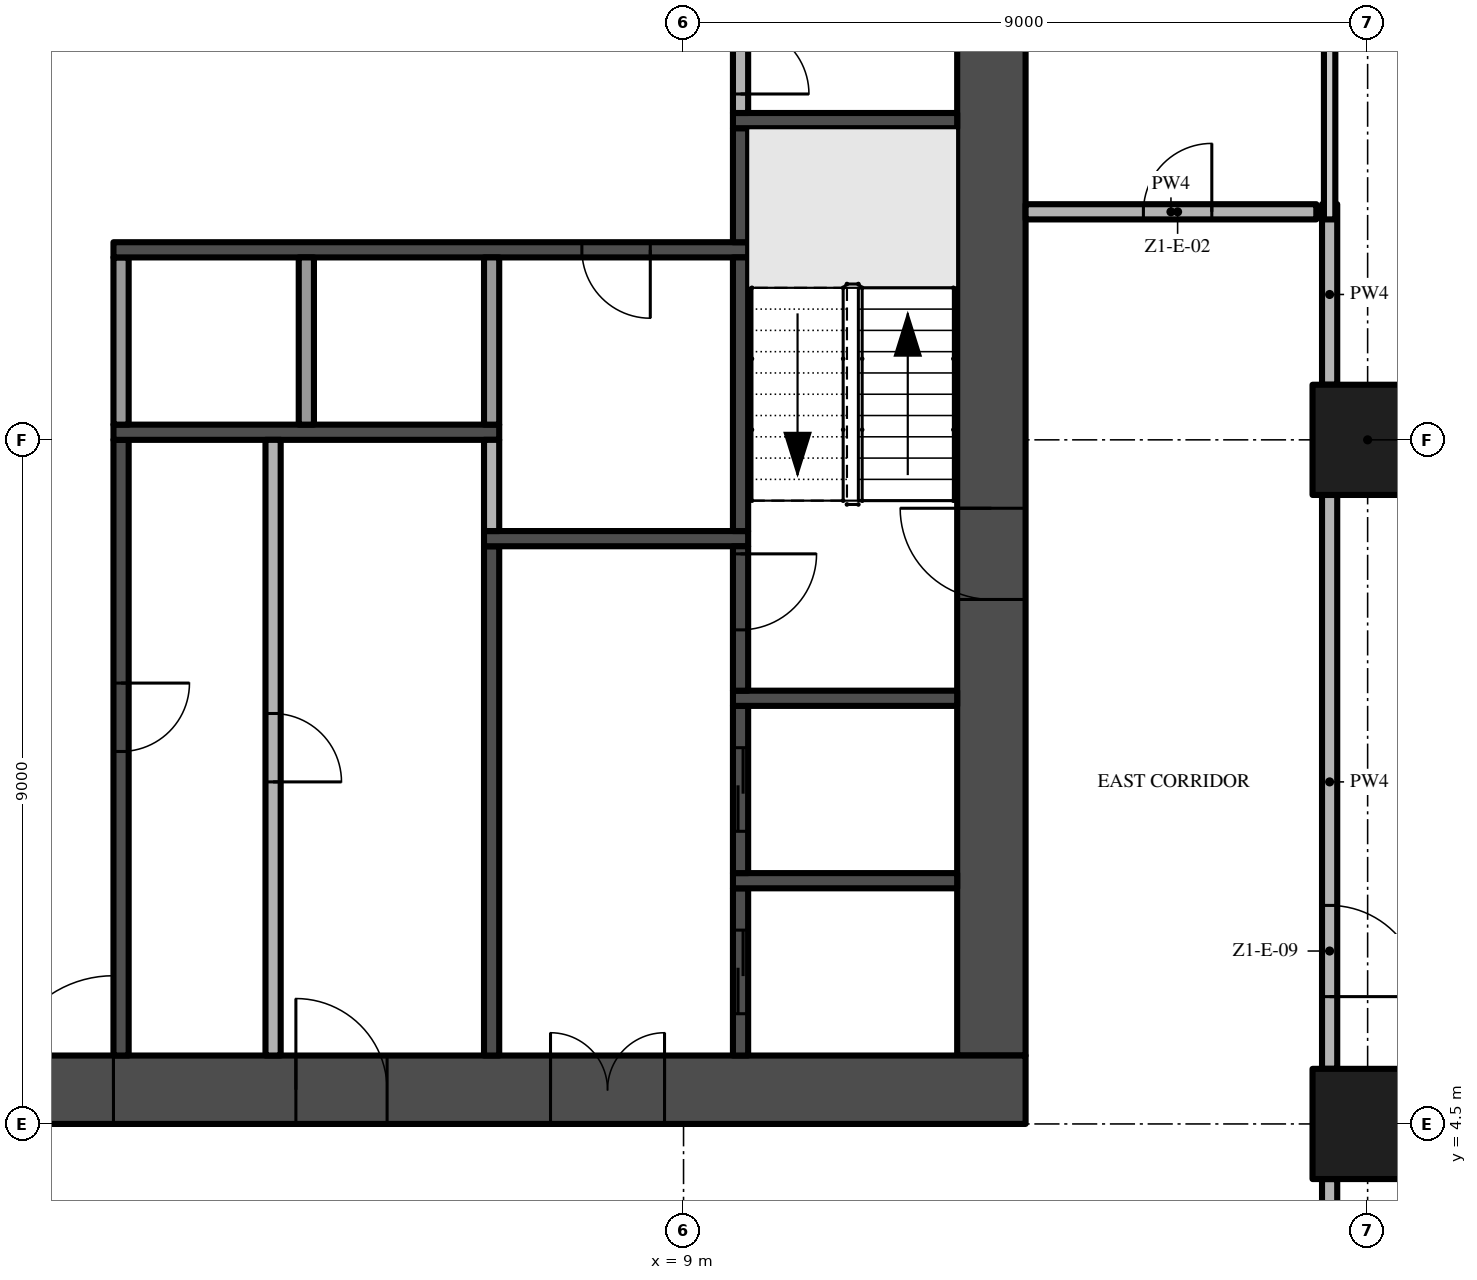
"""IFC4 building model, lengths in metres.
Left out: names, types, materials, properties, quantities, classifications, styles, units other than length and angle.
Written with IfcOpenShell. Run it as: python <this file> out.ifc"""

import sys

from ifc_helpers import new_model, si_unit, direction, frame, frame_2d, origin, origin_2d, place, context, subcontext, project, spatial, rectangle, extrude, element, fill, save


model = new_model("IFC4")
c1 = context("Model", 3, precision=1e-05, world=origin(), true_north=direction((0.0, 1.0)))
c2 = subcontext(c1, "Body", "Model", "MODEL_VIEW")
j1 = project(units=[si_unit("LENGTHUNIT", "METRE"), si_unit("PLANEANGLEUNIT", "RADIAN")], contexts=[c1])
p1 = place(None, origin())
s1 = spatial("IfcSite", under=j1, at=p1, CompositionType="ELEMENT")
p2 = place(p1, origin())
s2 = spatial("IfcBuilding", under=s1, at=p2, CompositionType="ELEMENT")
p3 = place(p2, frame((0.0, 0.0, 60.6)))
s3 = spatial("IfcBuildingStorey", under=s2, at=p3, CompositionType="ELEMENT", Elevation=60.6)
p4 = place(p3, frame((-13.5, 4.95, -0.3), z_axis=(0.0, 0.0, 1.0), x_axis=(1.0, 0.0, 0.0)))
e1 = element("IfcWall", 1, at=p4, inside=s3, PredefinedType="SHEAR", context=c2, shape_type="SweptSolid", body=[
    extrude(rectangle(XDim=27.0, YDim=0.9, at=frame_2d((13.5, 0.0))), origin(), (0.0, 0.0, 1.0), 3.8),
])
p5 = place(p4, frame((12.0, 0.0, 0.3)))
e2 = element("IfcOpeningElement", 2, at=p5, cuts=e1, PredefinedType="OPENING", context=c2, shape_type="SweptSolid", body=[
    extrude(rectangle(XDim=3.0, YDim=2.4, at=frame_2d((1.5, 1.2))), frame((0.0, 0.46, 0.0), z_axis=(0.0, -1.0, 0.0), x_axis=(1.0, 0.0, 0.0)), (0.0, 0.0, 1.0), 0.92),
])
p6 = place(p4, frame((4.9, 0.0, 0.3)))
e3 = element("IfcOpeningElement", 3, at=p6, cuts=e1, PredefinedType="OPENING", context=c2, shape_type="SweptSolid", body=[
    extrude(rectangle(XDim=1.2, YDim=2.2, at=frame_2d((0.6, 1.1))), frame((0.0, 0.46, 0.0), z_axis=(0.0, -1.0, 0.0), x_axis=(1.0, 0.0, 0.0)), (0.0, 0.0, 1.0), 0.92),
])
p7 = place(p4, frame((20.75, 0.0, 0.3)))
e4 = element("IfcOpeningElement", 4, at=p7, cuts=e1, PredefinedType="OPENING", context=c2, shape_type="SweptSolid", body=[
    extrude(rectangle(XDim=1.5, YDim=2.2, at=frame_2d((0.75, 1.1))), frame((0.0, 0.46, 0.0), z_axis=(0.0, -1.0, 0.0), x_axis=(1.0, 0.0, 0.0)), (0.0, 0.0, 1.0), 0.92),
])
p8 = place(p4, frame((17.4, 0.0, 0.3)))
e5 = element("IfcOpeningElement", 5, at=p8, cuts=e1, PredefinedType="OPENING", context=c2, shape_type="SweptSolid", body=[
    extrude(rectangle(XDim=1.2, YDim=2.2, at=frame_2d((0.6, 1.1))), frame((0.0, 0.46, 0.0), z_axis=(0.0, -1.0, 0.0), x_axis=(1.0, 0.0, 0.0)), (0.0, 0.0, 1.0), 0.92),
])
p9 = place(p3, frame((13.05, 5.4, -0.3), z_axis=(0.0, 0.0, 1.0), x_axis=(0.0, 1.0, 0.0)))
e6 = element("IfcWall", 6, at=p9, inside=s3, PredefinedType="SHEAR", context=c2, shape_type="SweptSolid", body=[
    extrude(rectangle(XDim=16.2, YDim=0.9, at=frame_2d((8.1, 0.0))), origin(), (0.0, 0.0, 1.0), 3.8),
])
p10 = place(p9, frame((6.0, 0.0, 0.3)))
e7 = element("IfcOpeningElement", 7, at=p10, cuts=e6, PredefinedType="OPENING", context=c2, shape_type="SweptSolid", body=[
    extrude(rectangle(XDim=1.2, YDim=2.2, at=frame_2d((0.6, 1.1))), frame((0.0, 0.46, 0.0), z_axis=(0.0, -1.0, 0.0), x_axis=(1.0, 0.0, 0.0)), (0.0, 0.0, 1.0), 0.92),
])
for number, where, z_axis, x_axis in (
    (8, (18.0, 13.5, 0.0), (0.0, 0.0, 1.0), (1.0, 0.0, 0.0)),
    (9, (18.0, 4.5, 0.0), (0.0, 0.0, 1.0), (1.0, 0.0, 0.0)),
):
    element("IfcColumn", number, at=place(p3, frame(where, z_axis=z_axis, x_axis=x_axis)), inside=s3, PredefinedType="COLUMN", context=c2, shape_type="SweptSolid", body=[
        extrude(rectangle(XDim=1.45, YDim=1.45, at=origin_2d()), origin(), (0.0, 0.0, 1.0), 3.5),
    ])
p11 = place(p3, frame((1.6, 13.5, 0.0), z_axis=(0.0, 0.0, 1.0), x_axis=(0.0, -1.0, 0.0)))
e10 = element("IfcWall", 10, at=p11, inside=s3, PredefinedType="SHEAR", context=c2, shape_type="SweptSolid", body=[
    extrude(rectangle(XDim=8.1, YDim=0.2, at=frame_2d((4.05, 0.0))), origin(), (0.0, 0.0, 1.0), 3.5),
])
p12 = place(p11, frame((3.2, 0.0, 0.0)))
e11 = element("IfcOpeningElement", 11, at=p12, cuts=e10, PredefinedType="OPENING", context=c2, shape_type="SweptSolid", body=[
    extrude(rectangle(XDim=0.9, YDim=2.1, at=frame_2d((0.45, 1.05))), frame((0.0, 0.11, 0.0), z_axis=(0.0, -1.0, 0.0), x_axis=(1.0, 0.0, 0.0)), (0.0, 0.0, 1.0), 0.22),
])
p13 = place(p3, frame((1.5, 13.6, 0.0), z_axis=(0.0, 0.0, 1.0), x_axis=(1.0, 0.0, 0.0)))
e12 = element("IfcWall", 12, at=p13, inside=s3, PredefinedType="SHEAR", context=c2, shape_type="SweptSolid", body=[
    extrude(rectangle(XDim=5.075, YDim=0.2, at=frame_2d((2.538, 0.0))), origin(), (0.0, 0.0, 1.0), 3.5),
])
p14 = place(p3, frame((1.6, 13.7, 0.0), z_axis=(0.0, 0.0, 1.0), x_axis=(0.0, 1.0, 0.0)))
e13 = element("IfcWall", 13, at=p14, inside=s3, PredefinedType="PARTITIONING", context=c2, shape_type="SweptSolid", body=[
    extrude(rectangle(XDim=2.2, YDim=0.2, at=frame_2d((1.1, 0.0))), origin(), (0.0, 0.0, 1.0), 3.5),
])
p15 = place(p3, frame((9.85, 16.0, 0.0), z_axis=(0.0, 0.0, 1.0), x_axis=(-1.0, 0.0, 0.0)))
e14 = element("IfcWall", 14, at=p15, inside=s3, PredefinedType="SHEAR", context=c2, shape_type="SweptSolid", body=[
    extrude(rectangle(XDim=8.35, YDim=0.2, at=frame_2d((4.175, 0.0))), origin(), (0.0, 0.0, 1.0), 3.5),
])
p16 = place(p15, frame((1.288, 0.0, 0.0)))
e15 = element("IfcOpeningElement", 15, at=p16, cuts=e14, PredefinedType="OPENING", context=c2, shape_type="SweptSolid", body=[
    extrude(rectangle(XDim=0.9, YDim=2.1, at=frame_2d((0.45, 1.05))), frame((0.0, 0.11, 0.0), z_axis=(0.0, -1.0, 0.0), x_axis=(1.0, 0.0, 0.0)), (0.0, 0.0, 1.0), 0.22),
])
p17 = place(p3, frame((3.6, 13.5, 0.0), z_axis=(0.0, 0.0, 1.0), x_axis=(0.0, -1.0, 0.0)))
e16 = element("IfcWall", 16, at=p17, inside=s3, PredefinedType="PARTITIONING", context=c2, shape_type="SweptSolid", body=[
    extrude(rectangle(XDim=8.1, YDim=0.2, at=frame_2d((4.05, 0.0))), origin(), (0.0, 0.0, 1.0), 3.5),
])
p18 = place(p17, frame((3.6, 0.0, 0.0)))
e17 = element("IfcOpeningElement", 17, at=p18, cuts=e16, PredefinedType="OPENING", context=c2, shape_type="SweptSolid", body=[
    extrude(rectangle(XDim=0.9, YDim=2.1, at=frame_2d((0.45, 1.05))), frame((0.0, 0.11, 0.0), z_axis=(0.0, -1.0, 0.0), x_axis=(1.0, 0.0, 0.0)), (0.0, 0.0, 1.0), 0.22),
])
p19 = place(p3, frame((4.037, 13.7, 0.0), z_axis=(0.0, 0.0, 1.0), x_axis=(0.0, 1.0, 0.0)))
e18 = element("IfcWall", 18, at=p19, inside=s3, PredefinedType="PARTITIONING", context=c2, shape_type="SweptSolid", body=[
    extrude(rectangle(XDim=2.2, YDim=0.2, at=frame_2d((1.1, 0.0))), origin(), (0.0, 0.0, 1.0), 3.5),
])
p20 = place(p3, frame((6.475, 5.4, 0.0), z_axis=(0.0, 0.0, 1.0), x_axis=(0.0, 1.0, 0.0)))
e19 = element("IfcWall", 19, at=p20, inside=s3, PredefinedType="SHEAR", context=c2, shape_type="SweptSolid", body=[
    extrude(rectangle(XDim=6.7, YDim=0.2, at=frame_2d((3.35, 0.0))), origin(), (0.0, 0.0, 1.0), 3.5),
])
p21 = place(p3, frame((6.375, 12.2, 0.0), z_axis=(0.0, 0.0, 1.0), x_axis=(1.0, 0.0, 0.0)))
e20 = element("IfcWall", 20, at=p21, inside=s3, PredefinedType="SHEAR", context=c2, shape_type="SweptSolid", body=[
    extrude(rectangle(XDim=3.475, YDim=0.2, at=frame_2d((1.738, 0.0))), origin(), (0.0, 0.0, 1.0), 3.5),
])
p22 = place(p3, frame((6.475, 12.3, 0.0), z_axis=(0.0, 0.0, 1.0), x_axis=(0.0, 1.0, 0.0)))
e21 = element("IfcWall", 21, at=p22, inside=s3, PredefinedType="PARTITIONING", context=c2, shape_type="SweptSolid", body=[
    extrude(rectangle(XDim=1.2, YDim=0.2, at=frame_2d((0.6, 0.0))), origin(), (0.0, 0.0, 1.0), 3.5),
])
p23 = place(p3, frame((6.475, 13.7, 0.0), z_axis=(0.0, 0.0, 1.0), x_axis=(0.0, 1.0, 0.0)))
e22 = element("IfcWall", 22, at=p23, inside=s3, PredefinedType="PARTITIONING", context=c2, shape_type="SweptSolid", body=[
    extrude(rectangle(XDim=2.2, YDim=0.2, at=frame_2d((1.1, 0.0))), origin(), (0.0, 0.0, 1.0), 3.5),
])
p24 = place(p3, frame((9.75, 5.4, 0.0), z_axis=(0.0, 0.0, 1.0), x_axis=(0.0, 1.0, 0.0)))
e23 = element("IfcWall", 23, at=p24, inside=s3, PredefinedType="SHEAR", context=c2, shape_type="SweptSolid", body=[
    extrude(rectangle(XDim=2.2, YDim=0.2, at=frame_2d((1.1, 0.0))), origin(), (0.0, 0.0, 1.0), 3.5),
])
p25 = place(p24, frame((0.55, 0.0, 0.0)))
e24 = element("IfcOpeningElement", 24, at=p25, cuts=e23, PredefinedType="OPENING", context=c2, shape_type="SweptSolid", body=[
    extrude(rectangle(XDim=1.1, YDim=2.1, at=frame_2d((0.55, 1.05))), frame((0.0, 0.11, 0.0), z_axis=(0.0, -1.0, 0.0), x_axis=(1.0, 0.0, 0.0)), (0.0, 0.0, 1.0), 0.22),
])
p26 = place(p3, frame((9.65, 7.7, 0.0), z_axis=(0.0, 0.0, 1.0), x_axis=(1.0, 0.0, 0.0)))
e25 = element("IfcWall", 25, at=p26, inside=s3, PredefinedType="SHEAR", context=c2, shape_type="SweptSolid", body=[
    extrude(rectangle(XDim=2.95, YDim=0.2, at=frame_2d((1.475, 0.0))), origin(), (0.0, 0.0, 1.0), 3.5),
])
p27 = place(p3, frame((9.75, 7.8, 0.0), z_axis=(0.0, 0.0, 1.0), x_axis=(0.0, 1.0, 0.0)))
e26 = element("IfcWall", 26, at=p27, inside=s3, PredefinedType="SHEAR", context=c2, shape_type="SweptSolid", body=[
    extrude(rectangle(XDim=2.2, YDim=0.2, at=frame_2d((1.1, 0.0))), origin(), (0.0, 0.0, 1.0), 3.5),
])
p28 = place(p27, frame((0.55, 0.0, 0.0)))
e27 = element("IfcOpeningElement", 27, at=p28, cuts=e26, PredefinedType="OPENING", context=c2, shape_type="SweptSolid", body=[
    extrude(rectangle(XDim=1.1, YDim=2.1, at=frame_2d((0.55, 1.05))), frame((0.0, 0.11, 0.0), z_axis=(0.0, -1.0, 0.0), x_axis=(1.0, 0.0, 0.0)), (0.0, 0.0, 1.0), 0.22),
])
p29 = place(p3, frame((9.65, 10.1, 0.0), z_axis=(0.0, 0.0, 1.0), x_axis=(1.0, 0.0, 0.0)))
e28 = element("IfcWall", 28, at=p29, inside=s3, PredefinedType="SHEAR", context=c2, shape_type="SweptSolid", body=[
    extrude(rectangle(XDim=2.95, YDim=0.2, at=frame_2d((1.475, 0.0))), origin(), (0.0, 0.0, 1.0), 3.5),
])
p30 = place(p3, frame((9.75, 12.1, 0.0), z_axis=(0.0, 0.0, 1.0), x_axis=(0.0, -1.0, 0.0)))
e29 = element("IfcWall", 29, at=p30, inside=s3, PredefinedType="SHEAR", context=c2, shape_type="SweptSolid", body=[
    extrude(rectangle(XDim=1.9, YDim=0.2, at=frame_2d((0.95, 0.0))), origin(), (0.0, 0.0, 1.0), 3.5),
])
p31 = place(p30, frame((0.1, 0.0, 0.0)))
e30 = element("IfcOpeningElement", 30, at=p31, cuts=e29, PredefinedType="OPENING", context=c2, shape_type="SweptSolid", body=[
    extrude(rectangle(XDim=1.0, YDim=2.2, at=frame_2d((0.5, 1.1))), frame((0.0, 0.11, 0.0), z_axis=(0.0, -1.0, 0.0), x_axis=(1.0, 0.0, 0.0)), (0.0, 0.0, 1.0), 0.22),
])
p32 = place(p3, frame((9.75, 12.3, 0.0), z_axis=(0.0, 0.0, 1.0), x_axis=(0.0, 1.0, 0.0)))
e31 = element("IfcWall", 31, at=p32, inside=s3, PredefinedType="SHEAR", context=c2, shape_type="SweptSolid", body=[
    extrude(rectangle(XDim=3.6, YDim=0.2, at=frame_2d((1.8, 0.0))), origin(), (0.0, 0.0, 1.0), 3.5),
])
p33 = place(p3, frame((9.75, 16.1, 0.0), z_axis=(0.0, 0.0, 1.0), x_axis=(0.0, 1.0, 0.0)))
e32 = element("IfcWall", 32, at=p33, inside=s3, PredefinedType="SHEAR", context=c2, shape_type="SweptSolid", body=[
    extrude(rectangle(XDim=1.5, YDim=0.2, at=frame_2d((0.75, 0.0))), origin(), (0.0, 0.0, 1.0), 3.5),
])
p34 = place(p3, frame((9.65, 17.7, 0.0), z_axis=(0.0, 0.0, 1.0), x_axis=(1.0, 0.0, 0.0)))
e33 = element("IfcWall", 33, at=p34, inside=s3, PredefinedType="SHEAR", context=c2, shape_type="SweptSolid", body=[
    extrude(rectangle(XDim=2.95, YDim=0.2, at=frame_2d((1.475, 0.0))), origin(), (0.0, 0.0, 1.0), 3.5),
])
p35 = place(p3, frame((9.75, 19.2, 0.0), z_axis=(0.0, 0.0, 1.0), x_axis=(0.0, -1.0, 0.0)))
e34 = element("IfcWall", 34, at=p35, inside=s3, PredefinedType="PARTITIONING", context=c2, shape_type="SweptSolid", body=[
    extrude(rectangle(XDim=1.4, YDim=0.2, at=frame_2d((0.7, 0.0))), origin(), (0.0, 0.0, 1.0), 3.5),
])
p36 = place(p35, frame((0.25, 0.0, 0.0)))
e35 = element("IfcOpeningElement", 35, at=p36, cuts=e34, PredefinedType="OPENING", context=c2, shape_type="SweptSolid", body=[
    extrude(rectangle(XDim=0.9, YDim=2.1, at=frame_2d((0.45, 1.05))), frame((0.0, 0.11, 0.0), z_axis=(0.0, -1.0, 0.0), x_axis=(1.0, 0.0, 0.0)), (0.0, 0.0, 1.0), 0.22),
])
p37 = place(p3, frame((13.5, 16.5, 0.0), z_axis=(0.0, 0.0, 1.0), x_axis=(1.0, 0.0, 0.0)))
e36 = element("IfcWall", 36, at=p37, inside=s3, PredefinedType="PARTITIONING", context=c2, shape_type="SweptSolid", body=[
    extrude(rectangle(XDim=3.825, YDim=0.2, at=frame_2d((1.913, 0.0))), origin(), (0.0, 0.0, 1.0), 3.5),
])
p38 = place(p37, frame((1.55, 0.0, 0.0)))
e37 = element("IfcOpeningElement", 37, at=p38, cuts=e36, PredefinedType="OPENING", context=c2, shape_type="SweptSolid", body=[
    extrude(rectangle(XDim=0.9, YDim=2.1, at=frame_2d((0.45, 1.05))), frame((0.0, 0.11, 0.0), z_axis=(0.0, -1.0, 0.0), x_axis=(1.0, 0.0, 0.0)), (0.0, 0.0, 1.0), 0.22),
])
p39 = place(p3, frame((17.5, -0.2, 0.0), z_axis=(0.0, 0.0, 1.0), x_axis=(0.0, 1.0, 0.0)))
e38 = element("IfcWall", 38, at=p39, inside=s3, PredefinedType="PARTITIONING", context=c2, shape_type="SweptSolid", body=[
    extrude(rectangle(XDim=3.975, YDim=0.2, at=frame_2d((1.988, 0.0))), origin(), (0.0, 0.0, 1.0), 3.5),
])
p40 = place(p3, frame((17.5, 12.775, 0.0), z_axis=(0.0, 0.0, 1.0), x_axis=(0.0, -1.0, 0.0)))
e39 = element("IfcWall", 39, at=p40, inside=s3, PredefinedType="PARTITIONING", context=c2, shape_type="SweptSolid", body=[
    extrude(rectangle(XDim=7.55, YDim=0.2, at=frame_2d((3.775, 0.0))), origin(), (0.0, 0.0, 1.0), 3.5),
])
p41 = place(p40, frame((5.4, 0.0, 0.0)))
e40 = element("IfcOpeningElement", 40, at=p41, cuts=e39, PredefinedType="OPENING", context=c2, shape_type="SweptSolid", body=[
    extrude(rectangle(XDim=1.2, YDim=2.4, at=frame_2d((0.6, 1.2))), frame((0.0, 0.11, 0.0), z_axis=(0.0, -1.0, 0.0), x_axis=(1.0, 0.0, 0.0)), (0.0, 0.0, 1.0), 0.22),
])
p42 = place(p3, frame((17.5, 14.225, 0.0), z_axis=(0.0, 0.0, 1.0), x_axis=(0.0, 1.0, 0.0)))
e41 = element("IfcWall", 41, at=p42, inside=s3, PredefinedType="PARTITIONING", context=c2, shape_type="SweptSolid", body=[
    extrude(rectangle(XDim=2.375, YDim=0.2, at=frame_2d((1.188, 0.0))), origin(), (0.0, 0.0, 1.0), 3.5),
])
p43 = place(p3, frame((17.5, 16.4, 0.0), z_axis=(0.0, 0.0, 1.0), x_axis=(0.0, 1.0, 0.0)))
e42 = element("IfcWall", 42, at=p43, inside=s3, PredefinedType="PARTITIONING", context=c2, shape_type="SweptSolid", body=[
    extrude(rectangle(XDim=4.75, YDim=0.15, at=frame_2d((2.375, 0.0))), origin(), (0.0, 0.0, 1.0), 3.5),
])
p44 = place(p5, frame((3.0, 0.0, 0.0), z_axis=(0.0, 0.0, 1.0), x_axis=(-1.0, 0.0, 0.0)))
e43 = element("IfcDoor", 43, at=p44, inside=s3, OperationType="DOUBLE_DOOR_SINGLE_SWING", PredefinedType="DOOR", context=c2, shape_type="SweptSolid", body=[
    extrude(rectangle(XDim=3.0, YDim=2.4, at=frame_2d((1.5, 1.2))), frame((0.0, 0.025, 0.0), z_axis=(0.0, -1.0, 0.0), x_axis=(1.0, 0.0, 0.0)), (0.0, 0.0, 1.0), 0.05),
])
fill(e2, e43)
p45 = place(p10, frame((1.2, 0.0, 0.0), z_axis=(0.0, 0.0, 1.0), x_axis=(-1.0, 0.0, 0.0)))
e44 = element("IfcDoor", 44, at=p45, inside=s3, OperationType="SINGLE_SWING_LEFT", PredefinedType="DOOR", context=c2, shape_type="SweptSolid", body=[
    extrude(rectangle(XDim=1.2, YDim=2.2, at=frame_2d((0.6, 1.1))), frame((0.0, 0.025, 0.0), z_axis=(0.0, -1.0, 0.0), x_axis=(1.0, 0.0, 0.0)), (0.0, 0.0, 1.0), 0.05),
])
fill(e7, e44)
p46 = place(p7, frame((1.5, 0.0, 0.0), z_axis=(0.0, 0.0, 1.0), x_axis=(-1.0, 0.0, 0.0)))
e45 = element("IfcDoor", 45, at=p46, inside=s3, OperationType="DOUBLE_DOOR_SINGLE_SWING", PredefinedType="DOOR", context=c2, shape_type="SweptSolid", body=[
    extrude(rectangle(XDim=1.5, YDim=2.2, at=frame_2d((0.75, 1.1))), frame((0.0, 0.025, 0.0), z_axis=(0.0, -1.0, 0.0), x_axis=(1.0, 0.0, 0.0)), (0.0, 0.0, 1.0), 0.05),
])
fill(e4, e45)
p47 = place(p8, frame((1.2, 0.0, 0.0), z_axis=(0.0, 0.0, 1.0), x_axis=(-1.0, 0.0, 0.0)))
e46 = element("IfcDoor", 46, at=p47, inside=s3, OperationType="SINGLE_SWING_RIGHT", PredefinedType="DOOR", context=c2, shape_type="SweptSolid", body=[
    extrude(rectangle(XDim=1.2, YDim=2.2, at=frame_2d((0.6, 1.1))), frame((0.0, 0.025, 0.0), z_axis=(0.0, -1.0, 0.0), x_axis=(1.0, 0.0, 0.0)), (0.0, 0.0, 1.0), 0.05),
])
fill(e5, e46)
p48 = place(p31, origin())
e47 = element("IfcDoor", 47, at=p48, inside=s3, OperationType="SINGLE_SWING_LEFT", PredefinedType="DOOR", context=c2, shape_type="SweptSolid", body=[
    extrude(rectangle(XDim=1.0, YDim=2.2, at=frame_2d((0.5, 1.1))), frame((0.0, 0.025, 0.0), z_axis=(0.0, -1.0, 0.0), x_axis=(1.0, 0.0, 0.0)), (0.0, 0.0, 1.0), 0.05),
])
fill(e30, e47)
p49 = place(p25, origin())
e48 = element("IfcDoor", 48, at=p49, inside=s3, OperationType="SLIDING_TO_RIGHT", PredefinedType="DOOR", context=c2, shape_type="SweptSolid", body=[
    extrude(rectangle(XDim=1.1, YDim=2.1, at=frame_2d((0.55, 1.05))), frame((0.0, 0.025, 0.0), z_axis=(0.0, -1.0, 0.0), x_axis=(1.0, 0.0, 0.0)), (0.0, 0.0, 1.0), 0.05),
])
fill(e24, e48)
p50 = place(p28, origin())
e49 = element("IfcDoor", 49, at=p50, inside=s3, OperationType="SLIDING_TO_RIGHT", PredefinedType="DOOR", context=c2, shape_type="SweptSolid", body=[
    extrude(rectangle(XDim=1.1, YDim=2.1, at=frame_2d((0.55, 1.05))), frame((0.0, 0.025, 0.0), z_axis=(0.0, -1.0, 0.0), x_axis=(1.0, 0.0, 0.0)), (0.0, 0.0, 1.0), 0.05),
])
fill(e27, e49)
p51 = place(p12, origin())
e50 = element("IfcDoor", 50, at=p51, inside=s3, OperationType="SINGLE_SWING_LEFT", PredefinedType="DOOR", context=c2, shape_type="SweptSolid", body=[
    extrude(rectangle(XDim=0.9, YDim=2.1, at=frame_2d((0.45, 1.05))), frame((0.0, 0.025, 0.0), z_axis=(0.0, -1.0, 0.0), x_axis=(1.0, 0.0, 0.0)), (0.0, 0.0, 1.0), 0.05),
])
fill(e11, e50)
p52 = place(p16, origin())
e51 = element("IfcDoor", 51, at=p52, inside=s3, OperationType="SINGLE_SWING_LEFT", PredefinedType="DOOR", context=c2, shape_type="SweptSolid", body=[
    extrude(rectangle(XDim=0.9, YDim=2.1, at=frame_2d((0.45, 1.05))), frame((0.0, 0.025, 0.0), z_axis=(0.0, -1.0, 0.0), x_axis=(1.0, 0.0, 0.0)), (0.0, 0.0, 1.0), 0.05),
])
fill(e15, e51)
p53 = place(p36, origin())
e52 = element("IfcDoor", 52, at=p53, inside=s3, OperationType="SINGLE_SWING_RIGHT", PredefinedType="DOOR", context=c2, shape_type="SweptSolid", body=[
    extrude(rectangle(XDim=0.9, YDim=2.1, at=frame_2d((0.45, 1.05))), frame((0.0, 0.025, 0.0), z_axis=(0.0, -1.0, 0.0), x_axis=(1.0, 0.0, 0.0)), (0.0, 0.0, 1.0), 0.05),
])
fill(e35, e52)
p54 = place(p18, origin())
e53 = element("IfcDoor", 53, at=p54, inside=s3, OperationType="SINGLE_SWING_RIGHT", PredefinedType="DOOR", context=c2, shape_type="SweptSolid", body=[
    extrude(rectangle(XDim=0.9, YDim=2.1, at=frame_2d((0.45, 1.05))), frame((0.0, 0.025, 0.0), z_axis=(0.0, -1.0, 0.0), x_axis=(1.0, 0.0, 0.0)), (0.0, 0.0, 1.0), 0.05),
])
fill(e17, e53)
p55 = place(p38, origin())
e54 = element("IfcDoor", 54, at=p55, inside=s3, OperationType="SINGLE_SWING_RIGHT", PredefinedType="DOOR", context=c2, shape_type="SweptSolid", body=[
    extrude(rectangle(XDim=0.9, YDim=2.1, at=frame_2d((0.45, 1.05))), frame((0.0, 0.025, 0.0), z_axis=(0.0, -1.0, 0.0), x_axis=(1.0, 0.0, 0.0)), (0.0, 0.0, 1.0), 0.05),
])
fill(e37, e54)
p56 = place(p41, origin())
e55 = element("IfcDoor", 55, at=p56, inside=s3, OperationType="SINGLE_SWING_RIGHT", PredefinedType="DOOR", context=c2, shape_type="SweptSolid", body=[
    extrude(rectangle(XDim=1.2, YDim=2.4, at=frame_2d((0.6, 1.2))), frame((0.0, 0.025, 0.0), z_axis=(0.0, -1.0, 0.0), x_axis=(1.0, 0.0, 0.0)), (0.0, 0.0, 1.0), 0.05),
])
fill(e40, e55)
save(model, sys.argv[1])
